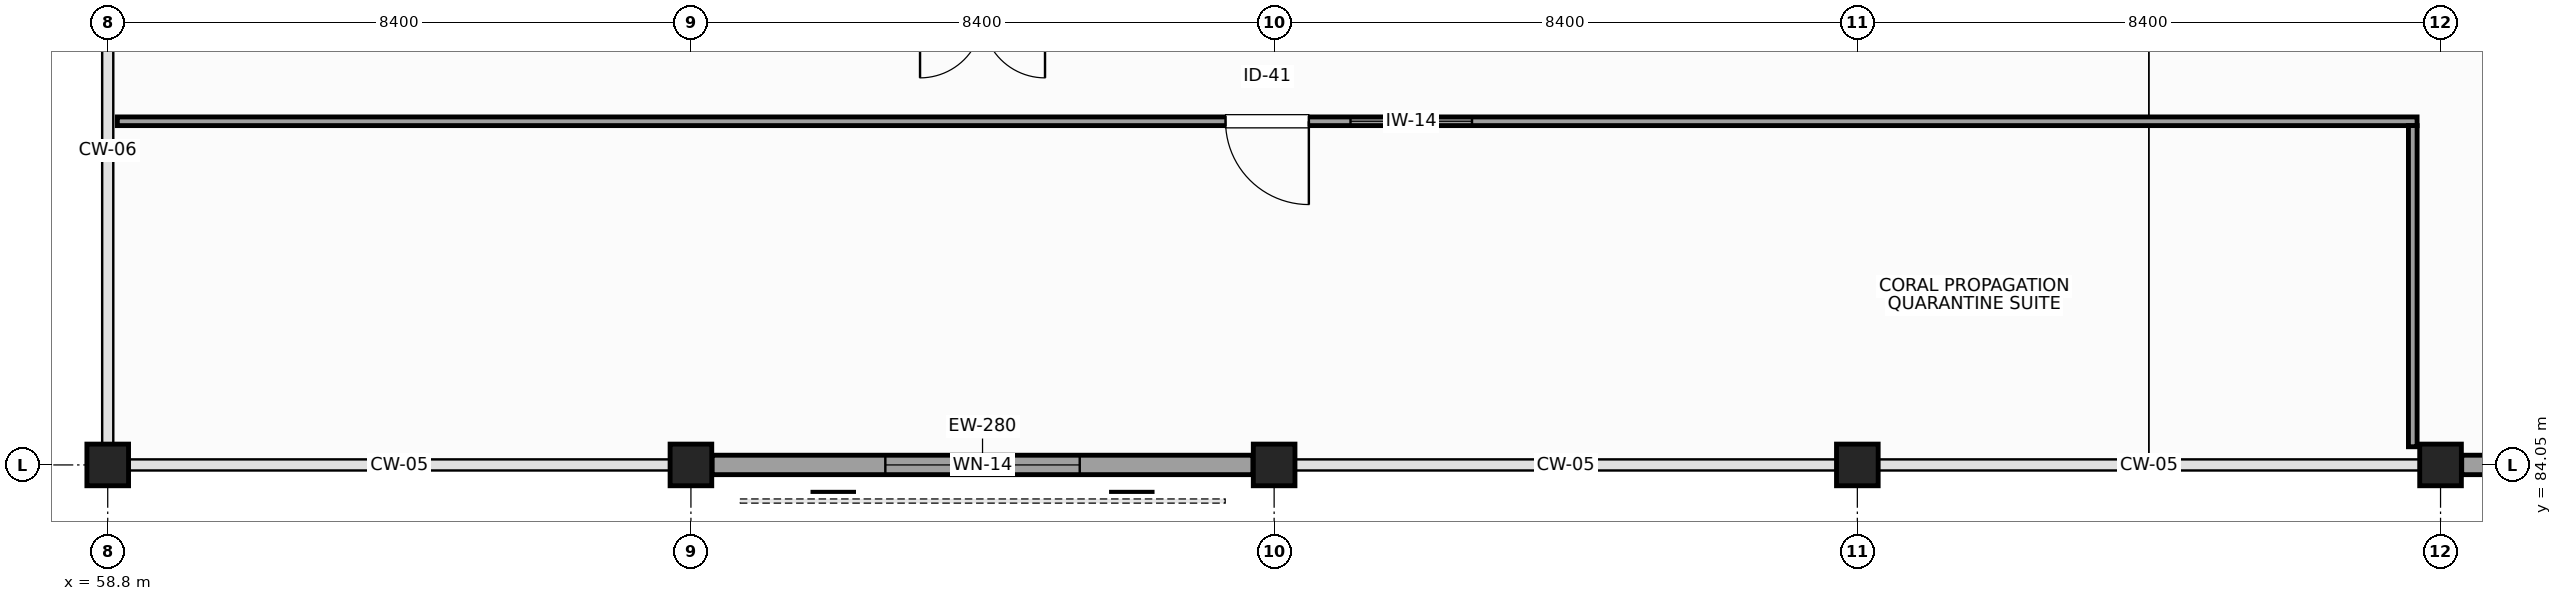
"""IFC4 building model, lengths in metres.
Left out: names, types, materials, properties, quantities, classifications, styles, units other than length and angle.
Written with IfcOpenShell. Run it as: python <this file> out.ifc"""

import sys

from ifc_helpers import new_model, si_unit, direction, frame, frame_2d, origin, origin_2d, place, context, subcontext, project, spatial, rectangle, extrude, element, fill, save


model = new_model("IFC4")
c1 = context("Model", 3, precision=1e-05, world=origin(), true_north=direction((0.0, 1.0)))
c2 = subcontext(c1, "Body", "Model", "MODEL_VIEW")
j1 = project(units=[si_unit("LENGTHUNIT", "METRE"), si_unit("PLANEANGLEUNIT", "RADIAN")], contexts=[c1])
p1 = place(None, origin())
s1 = spatial("IfcSite", under=j1, at=p1, CompositionType="ELEMENT")
p2 = place(p1, origin())
s2 = spatial("IfcBuilding", under=s1, at=p2, CompositionType="ELEMENT")
p3 = place(p2, frame((0.0, 0.0, 5.4)))
s3 = spatial("IfcBuildingStorey", under=s2, at=p3, CompositionType="ELEMENT", Elevation=5.4)
for number, where, z_axis, x_axis in (
    (1, (58.8, 84.05, 0.0), (0.0, 0.0, 1.0), (1.0, 0.0, 0.0)),
    (2, (67.2, 84.05, 0.0), (0.0, 0.0, 1.0), (1.0, 0.0, 0.0)),
    (3, (75.6, 84.05, 0.0), (0.0, 0.0, 1.0), (1.0, 0.0, 0.0)),
    (4, (84.0, 84.05, 0.0), (0.0, 0.0, 1.0), (1.0, 0.0, 0.0)),
    (5, (92.4, 84.05, 0.0), (0.0, 0.0, 1.0), (1.0, 0.0, 0.0)),
):
    element("IfcColumn", number, at=place(p3, frame(where, z_axis=z_axis, x_axis=x_axis)), inside=s3, PredefinedType="COLUMN", context=c2, shape_type="SweptSolid", body=[
        extrude(rectangle(XDim=0.6, YDim=0.6, at=origin_2d()), origin(), (0.0, 0.0, 1.0), 5.4),
    ])
p4 = place(p3, frame((67.505, 84.05, 0.0), z_axis=(0.0, 0.0, 1.0), x_axis=(1.0, 0.0, 0.0)))
e6 = element("IfcWall", 6, at=p4, inside=s3, PredefinedType="STANDARD", context=c2, shape_type="SweptSolid", body=[
    extrude(rectangle(XDim=7.79, YDim=0.28, at=frame_2d((3.895, 0.0))), origin(), (0.0, 0.0, 1.0), 4.23),
])
p5 = place(p4, frame((2.495, 0.0, 0.95)))
e7 = element("IfcOpeningElement", 7, at=p5, cuts=e6, PredefinedType="OPENING", context=c2, shape_type="SweptSolid", body=[
    extrude(rectangle(XDim=2.8, YDim=2.2, at=frame_2d((1.4, 1.1))), frame((0.0, 0.15, 0.0), z_axis=(0.0, -1.0, 0.0), x_axis=(1.0, 0.0, 0.0)), (0.0, 0.0, 1.0), 0.3),
])
p6 = place(p3, frame((92.705, 84.05, 0.0), z_axis=(0.0, 0.0, 1.0), x_axis=(1.0, 0.0, 0.0)))
e8 = element("IfcWall", 8, at=p6, inside=s3, PredefinedType="STANDARD", context=c2, shape_type="SweptSolid", body=[
    extrude(rectangle(XDim=7.79, YDim=0.28, at=frame_2d((3.895, 0.0))), origin(), (0.0, 0.0, 1.0), 4.23),
])
p7 = place(p6, frame((2.295, 0.0, 0.95)))
e9 = element("IfcOpeningElement", 9, at=p7, cuts=e8, PredefinedType="OPENING", context=c2, shape_type="SweptSolid", body=[
    extrude(rectangle(XDim=3.2, YDim=1.65, at=frame_2d((1.6, 0.825))), frame((0.0, 0.15, 0.0), z_axis=(0.0, -1.0, 0.0), x_axis=(1.0, 0.0, 0.0)), (0.0, 0.0, 1.0), 0.3),
])
p8 = place(p3, frame((58.938, 89.0, 0.0), z_axis=(0.0, 0.0, 1.0), x_axis=(1.0, 0.0, 0.0)))
e10 = element("IfcWall", 10, at=p8, inside=s3, PredefinedType="PARTITIONING", context=c2, shape_type="SweptSolid", body=[
    extrude(rectangle(XDim=33.124, YDim=0.125, at=frame_2d((16.562, 0.0))), origin(), (0.0, 0.0, 1.0), 2.622),
])
p9 = place(p8, frame((15.962, 0.0, 0.0)))
e11 = element("IfcOpeningElement", 11, at=p9, cuts=e10, PredefinedType="OPENING", context=c2, shape_type="SweptSolid", body=[
    extrude(rectangle(XDim=1.2, YDim=2.32, at=frame_2d((0.6, 1.16))), frame((0.0, 0.073, 0.0), z_axis=(0.0, -1.0, 0.0), x_axis=(1.0, 0.0, 0.0)), (0.0, 0.0, 1.0), 0.145),
])
p10 = place(p8, frame((17.762, 0.0, 1.05)))
e12 = element("IfcOpeningElement", 12, at=p10, cuts=e10, PredefinedType="OPENING", context=c2, shape_type="SweptSolid", body=[
    extrude(rectangle(XDim=1.75, YDim=1.38, at=frame_2d((0.875, 0.69))), frame((0.0, 0.073, 0.0), z_axis=(0.0, -1.0, 0.0), x_axis=(1.0, 0.0, 0.0)), (0.0, 0.0, 1.0), 0.145),
])
p11 = place(p3, frame((92.0, 84.312, 0.0), z_axis=(0.0, 0.0, 1.0), x_axis=(0.0, 1.0, 0.0)))
e13 = element("IfcWall", 13, at=p11, inside=s3, PredefinedType="PARTITIONING", context=c2, shape_type="SweptSolid", body=[
    extrude(rectangle(XDim=4.626, YDim=0.125, at=frame_2d((2.313, 0.0))), origin(), (0.0, 0.0, 1.0), 4.23),
])
p12 = place(p5, origin())
e14 = element("IfcWindow", 14, at=p12, inside=s3, PartitioningType="SINGLE_PANEL", PredefinedType="WINDOW", context=c2, shape_type="SweptSolid", body=[
    extrude(rectangle(XDim=2.8, YDim=2.2, at=frame_2d((1.4, 1.1))), frame((0.0, 0.03, 0.0), z_axis=(0.0, -1.0, 0.0), x_axis=(1.0, 0.0, 0.0)), (0.0, 0.0, 1.0), 0.06),
])
fill(e7, e14)
p13 = place(p9, frame((1.2, 0.0, 0.0), z_axis=(0.0, 0.0, 1.0), x_axis=(-1.0, 0.0, 0.0)))
e15 = element("IfcDoor", 15, at=p13, inside=s3, OperationType="SINGLE_SWING_LEFT", PredefinedType="DOOR", context=c2, shape_type="SweptSolid", body=[
    extrude(rectangle(XDim=1.2, YDim=2.32, at=frame_2d((0.6, 1.16))), frame((0.0, 0.025, 0.0), z_axis=(0.0, -1.0, 0.0), x_axis=(1.0, 0.0, 0.0)), (0.0, 0.0, 1.0), 0.05),
])
fill(e11, e15)
p14 = place(p10, origin())
e16 = element("IfcWindow", 16, at=p14, inside=s3, PartitioningType="SINGLE_PANEL", PredefinedType="WINDOW", context=c2, shape_type="SweptSolid", body=[
    extrude(rectangle(XDim=1.75, YDim=1.38, at=frame_2d((0.875, 0.69))), frame((0.0, 0.03, 0.0), z_axis=(0.0, -1.0, 0.0), x_axis=(1.0, 0.0, 0.0)), (0.0, 0.0, 1.0), 0.06),
])
fill(e12, e16)
save(model, sys.argv[1])
